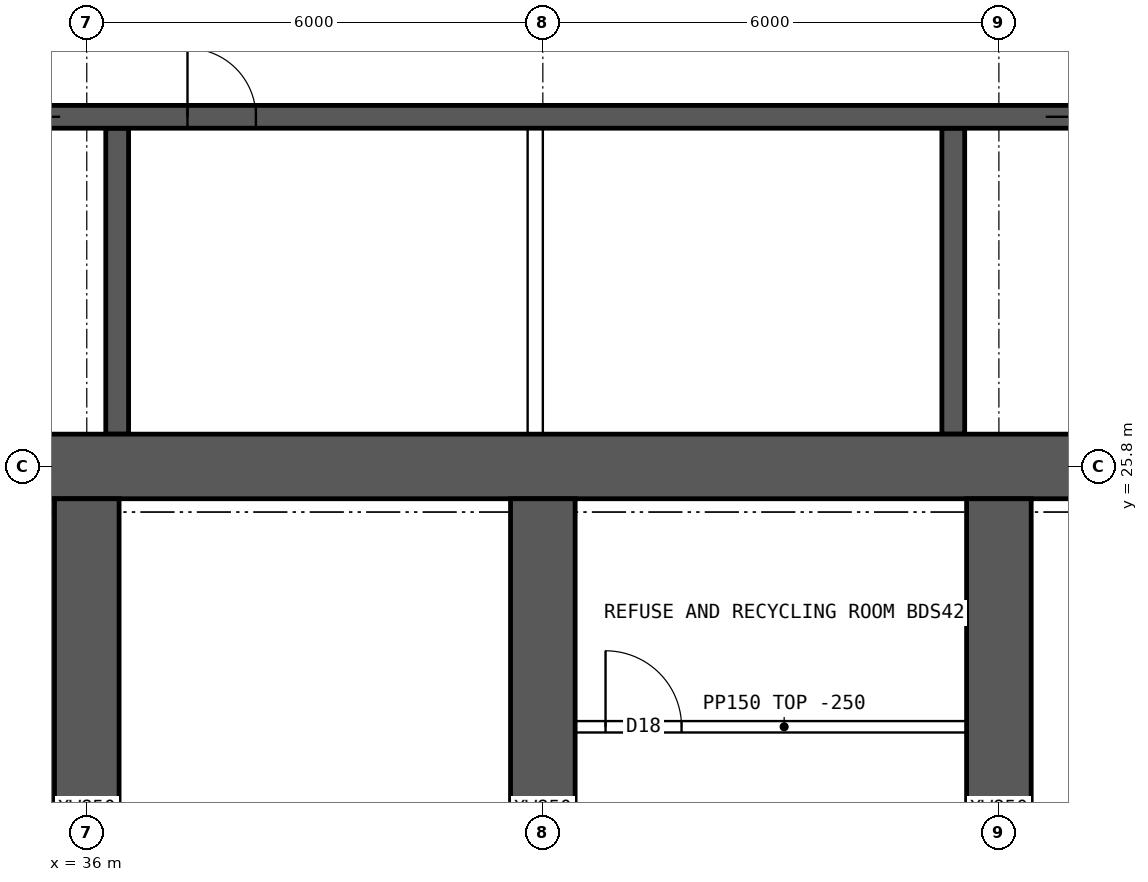
"""IFC4 building model, lengths in metres.
Left out: names, types, materials, properties, quantities, classifications, styles, units other than length and angle.
Written with IfcOpenShell. Run it as: python <this file> out.ifc"""

import sys

from ifc_helpers import new_model, si_unit, direction, frame, frame_2d, origin, place, context, subcontext, project, spatial, rectangle, extrude, element, fill, save


model = new_model("IFC4")
c1 = context("Model", 3, precision=1e-05, world=origin(), true_north=direction((0.0, 1.0)))
c2 = subcontext(c1, "Body", "Model", "MODEL_VIEW")
j1 = project(units=[si_unit("LENGTHUNIT", "METRE"), si_unit("PLANEANGLEUNIT", "RADIAN")], contexts=[c1])
p1 = place(None, origin())
s1 = spatial("IfcSite", under=j1, at=p1, CompositionType="ELEMENT")
p2 = place(p1, origin())
s2 = spatial("IfcBuilding", under=s1, at=p2, CompositionType="ELEMENT")
p3 = place(p2, frame((0.0, 0.0, 182.35)))
s3 = spatial("IfcBuildingStorey", under=s2, at=p3, CompositionType="ELEMENT", Elevation=182.35)
p4 = place(p3, frame((18.0, 25.8, 0.0), z_axis=(0.0, 0.0, 1.0), x_axis=(1.0, 0.0, 0.0)))
e1 = element("IfcWall", 1, at=p4, inside=s3, PredefinedType="SHEAR", context=c2, shape_type="SweptSolid", body=[
    extrude(rectangle(XDim=48.0, YDim=0.85, at=frame_2d((24.0, 0.0))), origin(), (0.0, 0.0, 1.0), 3.75),
])
p5 = place(p3, frame((18.425, 30.4, 0.0), z_axis=(0.0, 0.0, 1.0), x_axis=(1.0, 0.0, 0.0)))
e2 = element("IfcWall", 2, at=p5, inside=s3, PredefinedType="SHEAR", context=c2, shape_type="SweptSolid", body=[
    extrude(rectangle(XDim=47.15, YDim=0.3, at=frame_2d((23.575, 0.0))), origin(), (0.0, 0.0, 1.0), 3.75),
])
p6 = place(p5, frame((0.4, 0.0, 0.0)))
e3 = element("IfcOpeningElement", 3, at=p6, cuts=e2, PredefinedType="OPENING", context=c2, shape_type="SweptSolid", body=[
    extrude(rectangle(XDim=1.0, YDim=2.1, at=frame_2d((0.5, 1.05))), frame((0.0, 0.16, 0.0), z_axis=(0.0, -1.0, 0.0), x_axis=(1.0, 0.0, 0.0)), (0.0, 0.0, 1.0), 0.32),
])
p7 = place(p5, frame((45.75, 0.0, 0.0)))
e4 = element("IfcOpeningElement", 4, at=p7, cuts=e2, PredefinedType="OPENING", context=c2, shape_type="SweptSolid", body=[
    extrude(rectangle(XDim=1.0, YDim=2.1, at=frame_2d((0.5, 1.05))), frame((0.0, 0.16, 0.0), z_axis=(0.0, -1.0, 0.0), x_axis=(1.0, 0.0, 0.0)), (0.0, 0.0, 1.0), 0.32),
])
p8 = place(p5, frame((8.325, 0.0, 0.0)))
e5 = element("IfcOpeningElement", 5, at=p8, cuts=e2, PredefinedType="OPENING", context=c2, shape_type="SweptSolid", body=[
    extrude(rectangle(XDim=1.1, YDim=2.1, at=frame_2d((0.55, 1.05))), frame((0.0, 0.16, 0.0), z_axis=(0.0, -1.0, 0.0), x_axis=(1.0, 0.0, 0.0)), (0.0, 0.0, 1.0), 0.32),
])
p9 = place(p5, frame((10.925, 0.0, 0.0)))
e6 = element("IfcOpeningElement", 6, at=p9, cuts=e2, PredefinedType="OPENING", context=c2, shape_type="SweptSolid", body=[
    extrude(rectangle(XDim=1.1, YDim=2.1, at=frame_2d((0.55, 1.05))), frame((0.0, 0.16, 0.0), z_axis=(0.0, -1.0, 0.0), x_axis=(1.0, 0.0, 0.0)), (0.0, 0.0, 1.0), 0.32),
])
p10 = place(p5, frame((13.525, 0.0, 0.0)))
e7 = element("IfcOpeningElement", 7, at=p10, cuts=e2, PredefinedType="OPENING", context=c2, shape_type="SweptSolid", body=[
    extrude(rectangle(XDim=1.1, YDim=2.1, at=frame_2d((0.55, 1.05))), frame((0.0, 0.16, 0.0), z_axis=(0.0, -1.0, 0.0), x_axis=(1.0, 0.0, 0.0)), (0.0, 0.0, 1.0), 0.32),
])
p11 = place(p5, frame((16.125, 0.0, 0.0)))
e8 = element("IfcOpeningElement", 8, at=p11, cuts=e2, PredefinedType="OPENING", context=c2, shape_type="SweptSolid", body=[
    extrude(rectangle(XDim=1.1, YDim=2.1, at=frame_2d((0.55, 1.05))), frame((0.0, 0.16, 0.0), z_axis=(0.0, -1.0, 0.0), x_axis=(1.0, 0.0, 0.0)), (0.0, 0.0, 1.0), 0.32),
])
p12 = place(p5, frame((18.9, 0.0, 0.0)))
e9 = element("IfcOpeningElement", 9, at=p12, cuts=e2, PredefinedType="OPENING", context=c2, shape_type="SweptSolid", body=[
    extrude(rectangle(XDim=0.9, YDim=2.1, at=frame_2d((0.45, 1.05))), frame((0.0, 0.16, 0.0), z_axis=(0.0, -1.0, 0.0), x_axis=(1.0, 0.0, 0.0)), (0.0, 0.0, 1.0), 0.32),
])
p13 = place(p5, frame((30.192, 0.0, 0.0)))
e10 = element("IfcOpeningElement", 10, at=p13, cuts=e2, PredefinedType="OPENING", context=c2, shape_type="SweptSolid", body=[
    extrude(rectangle(XDim=1.1, YDim=2.1, at=frame_2d((0.55, 1.05))), frame((0.0, 0.16, 0.0), z_axis=(0.0, -1.0, 0.0), x_axis=(1.0, 0.0, 0.0)), (0.0, 0.0, 1.0), 0.32),
])
p14 = place(p5, frame((33.725, 0.0, 0.0)))
e11 = element("IfcOpeningElement", 11, at=p14, cuts=e2, PredefinedType="OPENING", context=c2, shape_type="SweptSolid", body=[
    extrude(rectangle(XDim=1.1, YDim=2.1, at=frame_2d((0.55, 1.05))), frame((0.0, 0.16, 0.0), z_axis=(0.0, -1.0, 0.0), x_axis=(1.0, 0.0, 0.0)), (0.0, 0.0, 1.0), 0.32),
])
p15 = place(p5, frame((37.258, 0.0, 0.0)))
e12 = element("IfcOpeningElement", 12, at=p15, cuts=e2, PredefinedType="OPENING", context=c2, shape_type="SweptSolid", body=[
    extrude(rectangle(XDim=1.1, YDim=2.1, at=frame_2d((0.55, 1.05))), frame((0.0, 0.16, 0.0), z_axis=(0.0, -1.0, 0.0), x_axis=(1.0, 0.0, 0.0)), (0.0, 0.0, 1.0), 0.32),
])
for number, where, z_axis, x_axis in (
    (13, (36.4, 26.225, 0.0), (0.0, 0.0, 1.0), (0.0, 1.0, 0.0)),
    (14, (47.4, 26.225, 0.0), (0.0, 0.0, 1.0), (0.0, 1.0, 0.0)),
):
    element("IfcWall", number, at=place(p3, frame(where, z_axis=z_axis, x_axis=x_axis)), inside=s3, PredefinedType="SHEAR", context=c2, shape_type="SweptSolid", body=[
        extrude(rectangle(XDim=4.025, YDim=0.3, at=frame_2d((2.012, 0.0))), origin(), (0.0, 0.0, 1.0), 3.75),
    ])
for number, where, z_axis, x_axis in (
    (15, (36.0, 17.2, 0.0), (0.0, 0.0, 1.0), (0.0, 1.0, 0.0)),
    (16, (42.0, 17.2, 0.0), (0.0, 0.0, 1.0), (0.0, 1.0, 0.0)),
    (17, (48.0, 17.2, 0.0), (0.0, 0.0, 1.0), (0.0, 1.0, 0.0)),
):
    element("IfcWall", number, at=place(p3, frame(where, z_axis=z_axis, x_axis=x_axis)), inside=s3, PredefinedType="SHEAR", context=c2, shape_type="SweptSolid", body=[
        extrude(rectangle(XDim=8.175, YDim=0.85, at=frame_2d((4.087, 0.0))), origin(), (0.0, 0.0, 1.0), 3.75),
    ])
p16 = place(p3, frame((41.9, 26.225, 0.0), z_axis=(0.0, 0.0, 1.0), x_axis=(0.0, 1.0, 0.0)))
e18 = element("IfcWall", 18, at=p16, inside=s3, PredefinedType="SOLIDWALL", context=c2, shape_type="SweptSolid", body=[
    extrude(rectangle(XDim=4.025, YDim=0.2, at=frame_2d((2.012, 0.0))), origin(), (0.0, 0.0, 1.0), 3.5),
])
p17 = place(p3, frame((42.425, 22.375, 0.0), z_axis=(0.0, 0.0, 1.0), x_axis=(1.0, 0.0, 0.0)))
e19 = element("IfcWall", 19, at=p17, inside=s3, PredefinedType="PARTITIONING", context=c2, shape_type="SweptSolid", body=[
    extrude(rectangle(XDim=5.5, YDim=0.15, at=frame_2d((2.75, 0.0))), origin(), (0.0, 0.0, 1.0), 3.5),
])
p18 = place(p17, frame((0.4, 0.0, 0.0)))
e20 = element("IfcOpeningElement", 20, at=p18, cuts=e19, PredefinedType="OPENING", context=c2, shape_type="SweptSolid", body=[
    extrude(rectangle(XDim=1.0, YDim=2.1, at=frame_2d((0.5, 1.05))), frame((0.0, 0.085, 0.0), z_axis=(0.0, -1.0, 0.0), x_axis=(1.0, 0.0, 0.0)), (0.0, 0.0, 1.0), 0.17),
])
p19 = place(p11, origin())
e21 = element("IfcDoor", 21, at=p19, inside=s3, OperationType="DOUBLE_DOOR_SLIDING", PredefinedType="DOOR", context=c2, shape_type="SweptSolid", body=[
    extrude(rectangle(XDim=1.1, YDim=2.1, at=frame_2d((0.55, 1.05))), frame((0.0, 0.025, 0.0), z_axis=(0.0, -1.0, 0.0), x_axis=(1.0, 0.0, 0.0)), (0.0, 0.0, 1.0), 0.05),
])
fill(e8, e21)
p20 = place(p12, origin())
e22 = element("IfcDoor", 22, at=p20, inside=s3, OperationType="SINGLE_SWING_LEFT", PredefinedType="DOOR", context=c2, shape_type="SweptSolid", body=[
    extrude(rectangle(XDim=0.9, YDim=2.1, at=frame_2d((0.45, 1.05))), frame((0.0, 0.025, 0.0), z_axis=(0.0, -1.0, 0.0), x_axis=(1.0, 0.0, 0.0)), (0.0, 0.0, 1.0), 0.05),
])
fill(e9, e22)
p21 = place(p13, origin())
e23 = element("IfcDoor", 23, at=p21, inside=s3, OperationType="DOUBLE_DOOR_SLIDING", PredefinedType="DOOR", context=c2, shape_type="SweptSolid", body=[
    extrude(rectangle(XDim=1.1, YDim=2.1, at=frame_2d((0.55, 1.05))), frame((0.0, 0.025, 0.0), z_axis=(0.0, -1.0, 0.0), x_axis=(1.0, 0.0, 0.0)), (0.0, 0.0, 1.0), 0.05),
])
fill(e10, e23)
p22 = place(p18, origin())
e24 = element("IfcDoor", 24, at=p22, inside=s3, OperationType="SINGLE_SWING_LEFT", PredefinedType="DOOR", context=c2, shape_type="SweptSolid", body=[
    extrude(rectangle(XDim=1.0, YDim=2.1, at=frame_2d((0.5, 1.05))), frame((0.0, 0.025, 0.0), z_axis=(0.0, -1.0, 0.0), x_axis=(1.0, 0.0, 0.0)), (0.0, 0.0, 1.0), 0.05),
])
fill(e20, e24)
save(model, sys.argv[1])
